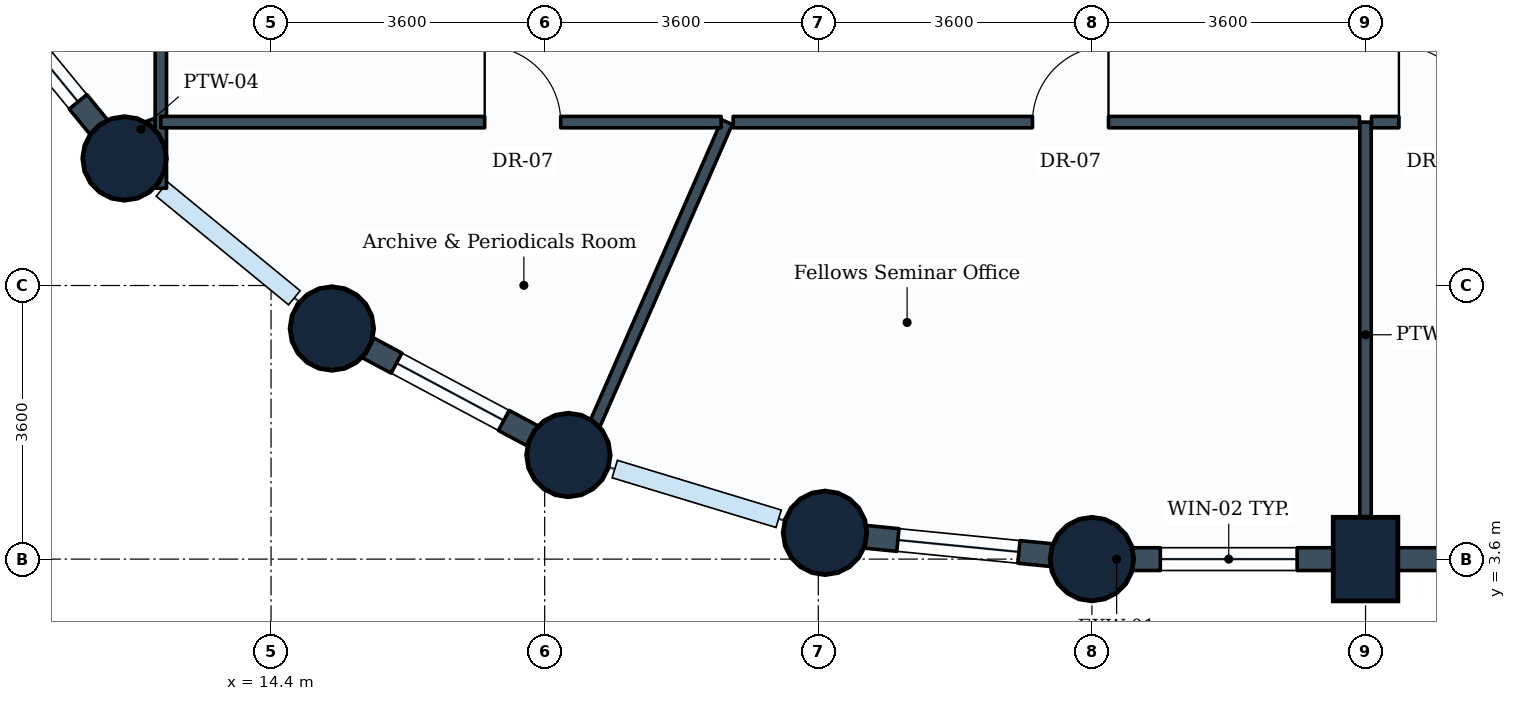
"""IFC4 building model, lengths in metres.
Left out: names, types, materials, properties, quantities, classifications, styles, units other than length and angle.
Written with IfcOpenShell. Run it as: python <this file> out.ifc"""

import sys

from ifc_helpers import new_model, si_unit, direction, frame, frame_2d, origin, origin_2d, place, context, subcontext, project, spatial, rectangle, circle, extrude, element, fill, save


model = new_model("IFC4")
c1 = context("Model", 3, precision=1e-05, world=origin(), true_north=direction((0.0, 1.0)))
c2 = subcontext(c1, "Body", "Model", "MODEL_VIEW")
j1 = project(units=[si_unit("LENGTHUNIT", "METRE"), si_unit("PLANEANGLEUNIT", "RADIAN")], contexts=[c1])
p1 = place(None, origin())
s1 = spatial("IfcSite", under=j1, at=p1, CompositionType="ELEMENT")
p2 = place(p1, origin())
s2 = spatial("IfcBuilding", under=s1, at=p2, CompositionType="ELEMENT")
p3 = place(p2, frame((0.0, 0.0, 87.9)))
s3 = spatial("IfcBuildingStorey", under=s2, at=p3, CompositionType="ELEMENT", Elevation=87.9)
for number, where, z_axis, x_axis in (
    (1, (12.472, 8.872, 0.0), (0.0, 0.0, 1.0), (1.0, 0.0, 0.0)),
    (2, (15.2, 6.634, 0.0), (0.0, 0.0, 1.0), (1.0, 0.0, 0.0)),
    (3, (18.312, 4.97, 0.0), (0.0, 0.0, 1.0), (1.0, 0.0, 0.0)),
    (4, (21.688, 3.946, 0.0), (0.0, 0.0, 1.0), (1.0, 0.0, 0.0)),
    (5, (25.2, 3.6, 0.0), (0.0, 0.0, 1.0), (1.0, 0.0, 0.0)),
):
    element("IfcColumn", number, at=place(p3, frame(where, z_axis=z_axis, x_axis=x_axis)), inside=s3, PredefinedType="COLUMN", context=c2, shape_type="SweptSolid", body=[
        extrude(circle(Radius=0.55, at=origin_2d()), origin(), (0.0, 0.0, 1.0), 3.9),
    ])
p4 = place(p3, frame((28.8, 3.6, 0.0), z_axis=(0.0, 0.0, 1.0), x_axis=(1.0, 0.0, 0.0)))
e6 = element("IfcColumn", 6, at=p4, inside=s3, PredefinedType="COLUMN", context=c2, shape_type="SweptSolid", body=[
    extrude(rectangle(XDim=0.85, YDim=1.1, at=origin_2d()), origin(), (0.0, 0.0, 1.0), 3.9),
])
p5 = place(p3, frame((28.8, 3.6, 0.0), z_axis=(0.0, 0.0, 1.0), x_axis=(-1.0, 0.0, 0.0)))
e7 = element("IfcWall", 7, at=p5, inside=s3, PredefinedType="STANDARD", context=c2, shape_type="SweptSolid", body=[
    extrude(rectangle(XDim=3.6, YDim=0.3, at=frame_2d((1.8, 0.0))), origin(), (0.0, 0.0, 1.0), 2.93),
])
p6 = place(p5, frame((0.9, 0.0, 0.85)))
e8 = element("IfcOpeningElement", 8, at=p6, cuts=e7, PredefinedType="OPENING", context=c2, shape_type="SweptSolid", body=[
    extrude(rectangle(XDim=1.8, YDim=1.35, at=frame_2d((0.9, 0.675))), frame((0.0, 0.16, 0.0), z_axis=(0.0, -1.0, 0.0), x_axis=(1.0, 0.0, 0.0)), (0.0, 0.0, 1.0), 0.32),
])
p7 = place(p3, frame((32.4, 3.6, 0.0), z_axis=(0.0, 0.0, 1.0), x_axis=(-1.0, 0.0, 0.0)))
e9 = element("IfcWall", 9, at=p7, inside=s3, PredefinedType="STANDARD", context=c2, shape_type="SweptSolid", body=[
    extrude(rectangle(XDim=3.6, YDim=0.3, at=frame_2d((1.8, 0.0))), origin(), (0.0, 0.0, 1.0), 2.93),
])
p8 = place(p3, frame((12.472, 8.872, 0.0), z_axis=(0.0, 0.0, 1.0), x_axis=(-0.634258295121, 0.773121216285, 0.0)))
e10 = element("IfcWall", 10, at=p8, inside=s3, PredefinedType="STANDARD", context=c2, shape_type="SweptSolid", body=[
    extrude(rectangle(XDim=3.529, YDim=0.3, at=frame_2d((1.764, 0.0))), origin(), (0.0, 0.0, 1.0), 2.93),
])
p9 = place(p8, frame((0.964, 0.0, 0.85)))
e11 = element("IfcOpeningElement", 11, at=p9, cuts=e10, PredefinedType="OPENING", context=c2, shape_type="SweptSolid", body=[
    extrude(rectangle(XDim=1.6, YDim=1.35, at=frame_2d((0.8, 0.675))), frame((0.0, 0.16, 0.0), z_axis=(0.0, -1.0, 0.0), x_axis=(1.0, 0.0, 0.0)), (0.0, 0.0, 1.0), 0.32),
])
p10 = place(p3, frame((18.312, 4.97, 0.0), z_axis=(0.0, 0.0, 1.0), x_axis=(-0.881846862014, 0.471535907389, 0.0)))
e12 = element("IfcWall", 12, at=p10, inside=s3, PredefinedType="STANDARD", context=c2, shape_type="SweptSolid", body=[
    extrude(rectangle(XDim=3.529, YDim=0.3, at=frame_2d((1.765, 0.0))), origin(), (0.0, 0.0, 1.0), 2.93),
])
p11 = place(p10, frame((0.964, 0.0, 0.85)))
e13 = element("IfcOpeningElement", 13, at=p11, cuts=e12, PredefinedType="OPENING", context=c2, shape_type="SweptSolid", body=[
    extrude(rectangle(XDim=1.6, YDim=1.35, at=frame_2d((0.8, 0.675))), frame((0.0, 0.16, 0.0), z_axis=(0.0, -1.0, 0.0), x_axis=(1.0, 0.0, 0.0)), (0.0, 0.0, 1.0), 0.32),
])
p12 = place(p3, frame((25.2, 3.6, 0.0), z_axis=(0.0, 0.0, 1.0), x_axis=(-0.995183369056, 0.098030923459, 0.0)))
e14 = element("IfcWall", 14, at=p12, inside=s3, PredefinedType="STANDARD", context=c2, shape_type="SweptSolid", body=[
    extrude(rectangle(XDim=3.529, YDim=0.3, at=frame_2d((1.765, 0.0))), origin(), (0.0, 0.0, 1.0), 2.93),
])
p13 = place(p12, frame((0.965, 0.0, 0.85)))
e15 = element("IfcOpeningElement", 15, at=p13, cuts=e14, PredefinedType="OPENING", context=c2, shape_type="SweptSolid", body=[
    extrude(rectangle(XDim=1.6, YDim=1.35, at=frame_2d((0.8, 0.675))), frame((0.0, 0.16, 0.0), z_axis=(0.0, -1.0, 0.0), x_axis=(1.0, 0.0, 0.0)), (0.0, 0.0, 1.0), 0.32),
])
p14 = place(p3, frame((28.8, 9.35, 0.0), z_axis=(0.0, 0.0, 1.0), x_axis=(0.0, -1.0, 0.0)))
e16 = element("IfcWall", 16, at=p14, inside=s3, PredefinedType="PARTITIONING", context=c2, shape_type="SweptSolid", body=[
    extrude(rectangle(XDim=5.596, YDim=0.15, at=frame_2d((2.798, 0.0))), origin(), (0.0, 0.0, 1.0), 3.635),
])
p15 = place(p3, frame((12.95, 9.35, 0.0), z_axis=(0.0, 0.0, 1.0), x_axis=(-0.939538101119, -0.342444384601, 0.0)))
e17 = element("IfcWall", 17, at=p15, inside=s3, PredefinedType="PARTITIONING", context=c2, shape_type="SweptSolid", body=[
    extrude(rectangle(XDim=0.559, YDim=0.15, at=frame_2d((0.279, 0.0))), origin(), (0.0, 0.0, 1.0), 2.93),
])
p16 = place(p3, frame((20.4, 9.35, 0.0), z_axis=(0.0, 0.0, 1.0), x_axis=(-0.400943051832, -0.916102979576, 0.0)))
e18 = element("IfcWall", 18, at=p16, inside=s3, PredefinedType="PARTITIONING", context=c2, shape_type="SweptSolid", body=[
    extrude(rectangle(XDim=4.846, YDim=0.15, at=frame_2d((2.423, 0.0))), origin(), (0.0, 0.0, 1.0), 2.93),
])
p17 = place(p3, frame((12.95, 8.48, 0.0), z_axis=(0.0, 0.0, 1.0), x_axis=(0.0, 1.0, 0.0)))
e19 = element("IfcWall", 19, at=p17, inside=s3, PredefinedType="PARTITIONING", context=c2, shape_type="SweptSolid", body=[
    extrude(rectangle(XDim=8.241, YDim=0.15, at=frame_2d((4.121, 0.0))), origin(), (0.0, 0.0, 1.0), 2.93),
])
p18 = place(p17, frame((5.131, 0.0, 0.0)))
e20 = element("IfcOpeningElement", 20, at=p18, cuts=e19, PredefinedType="OPENING", context=c2, shape_type="SweptSolid", body=[
    extrude(rectangle(XDim=1.0, YDim=2.1, at=frame_2d((0.5, 1.05))), frame((0.0, 0.085, 0.0), z_axis=(0.0, -1.0, 0.0), x_axis=(1.0, 0.0, 0.0)), (0.0, 0.0, 1.0), 0.17),
])
p19 = place(p3, frame((12.95, 9.35, 0.0), z_axis=(0.0, 0.0, 1.0), x_axis=(1.0, 0.0, 0.0)))
e21 = element("IfcWall", 21, at=p19, inside=s3, PredefinedType="PARTITIONING", context=c2, shape_type="SweptSolid", body=[
    extrude(rectangle(XDim=7.371, YDim=0.15, at=frame_2d((3.686, 0.0))), origin(), (0.0, 0.0, 1.0), 3.19),
])
p20 = place(p19, frame((4.261, 0.0, 0.0)))
e22 = element("IfcOpeningElement", 22, at=p20, cuts=e21, PredefinedType="OPENING", context=c2, shape_type="SweptSolid", body=[
    extrude(rectangle(XDim=1.0, YDim=2.1, at=frame_2d((0.5, 1.05))), frame((0.0, 0.085, 0.0), z_axis=(0.0, -1.0, 0.0), x_axis=(1.0, 0.0, 0.0)), (0.0, 0.0, 1.0), 0.17),
])
p21 = place(p3, frame((20.479, 9.35, 0.0), z_axis=(0.0, 0.0, 1.0), x_axis=(1.0, 0.0, 0.0)))
e23 = element("IfcWall", 23, at=p21, inside=s3, PredefinedType="PARTITIONING", context=c2, shape_type="SweptSolid", body=[
    extrude(rectangle(XDim=8.242, YDim=0.15, at=frame_2d((4.121, 0.0))), origin(), (0.0, 0.0, 1.0), 3.18),
])
p22 = place(p21, frame((3.939, 0.0, 0.0)))
e24 = element("IfcOpeningElement", 24, at=p22, cuts=e23, PredefinedType="OPENING", context=c2, shape_type="SweptSolid", body=[
    extrude(rectangle(XDim=1.0, YDim=2.1, at=frame_2d((0.5, 1.05))), frame((0.0, 0.085, 0.0), z_axis=(0.0, -1.0, 0.0), x_axis=(1.0, 0.0, 0.0)), (0.0, 0.0, 1.0), 0.17),
])
p23 = place(p3, frame((28.879, 9.35, 0.0), z_axis=(0.0, 0.0, 1.0), x_axis=(1.0, 0.0, 0.0)))
e25 = element("IfcWall", 25, at=p23, inside=s3, PredefinedType="PARTITIONING", context=c2, shape_type="SweptSolid", body=[
    extrude(rectangle(XDim=5.521, YDim=0.15, at=frame_2d((2.76, 0.0))), origin(), (0.0, 0.0, 1.0), 3.635),
])
p24 = place(p23, frame((0.36, 0.0, 0.0)))
e26 = element("IfcOpeningElement", 26, at=p24, cuts=e25, PredefinedType="OPENING", context=c2, shape_type="SweptSolid", body=[
    extrude(rectangle(XDim=1.0, YDim=2.1, at=frame_2d((0.5, 1.05))), frame((0.0, 0.085, 0.0), z_axis=(0.0, -1.0, 0.0), x_axis=(1.0, 0.0, 0.0)), (0.0, 0.0, 1.0), 0.17),
])
p25 = place(p6, origin())
e27 = element("IfcWindow", 27, at=p25, inside=s3, PartitioningType="SINGLE_PANEL", PredefinedType="WINDOW", context=c2, shape_type="SweptSolid", body=[
    extrude(rectangle(XDim=1.8, YDim=1.35, at=frame_2d((0.9, 0.675))), frame((0.0, 0.03, 0.0), z_axis=(0.0, -1.0, 0.0), x_axis=(1.0, 0.0, 0.0)), (0.0, 0.0, 1.0), 0.06),
])
fill(e8, e27)
p26 = place(p9, origin())
e28 = element("IfcWindow", 28, at=p26, inside=s3, PartitioningType="SINGLE_PANEL", PredefinedType="WINDOW", context=c2, shape_type="SweptSolid", body=[
    extrude(rectangle(XDim=1.6, YDim=1.35, at=frame_2d((0.8, 0.675))), frame((0.0, 0.03, 0.0), z_axis=(0.0, -1.0, 0.0), x_axis=(1.0, 0.0, 0.0)), (0.0, 0.0, 1.0), 0.06),
])
fill(e11, e28)
p27 = place(p11, origin())
e29 = element("IfcWindow", 29, at=p27, inside=s3, PartitioningType="SINGLE_PANEL", PredefinedType="WINDOW", context=c2, shape_type="SweptSolid", body=[
    extrude(rectangle(XDim=1.6, YDim=1.35, at=frame_2d((0.8, 0.675))), frame((0.0, 0.03, 0.0), z_axis=(0.0, -1.0, 0.0), x_axis=(1.0, 0.0, 0.0)), (0.0, 0.0, 1.0), 0.06),
])
fill(e13, e29)
p28 = place(p13, origin())
e30 = element("IfcWindow", 30, at=p28, inside=s3, PartitioningType="SINGLE_PANEL", PredefinedType="WINDOW", context=c2, shape_type="SweptSolid", body=[
    extrude(rectangle(XDim=1.6, YDim=1.35, at=frame_2d((0.8, 0.675))), frame((0.0, 0.03, 0.0), z_axis=(0.0, -1.0, 0.0), x_axis=(1.0, 0.0, 0.0)), (0.0, 0.0, 1.0), 0.06),
])
fill(e15, e30)
p29 = place(p20, origin())
e31 = element("IfcDoor", 31, at=p29, inside=s3, OperationType="SINGLE_SWING_LEFT", PredefinedType="DOOR", context=c2, shape_type="SweptSolid", body=[
    extrude(rectangle(XDim=1.0, YDim=2.1, at=frame_2d((0.5, 1.05))), frame((0.0, 0.025, 0.0), z_axis=(0.0, -1.0, 0.0), x_axis=(1.0, 0.0, 0.0)), (0.0, 0.0, 1.0), 0.05),
])
fill(e22, e31)
p30 = place(p22, origin())
e32 = element("IfcDoor", 32, at=p30, inside=s3, OperationType="SINGLE_SWING_RIGHT", PredefinedType="DOOR", context=c2, shape_type="SweptSolid", body=[
    extrude(rectangle(XDim=1.0, YDim=2.1, at=frame_2d((0.5, 1.05))), frame((0.0, 0.025, 0.0), z_axis=(0.0, -1.0, 0.0), x_axis=(1.0, 0.0, 0.0)), (0.0, 0.0, 1.0), 0.05),
])
fill(e24, e32)
p31 = place(p24, origin())
e33 = element("IfcDoor", 33, at=p31, inside=s3, OperationType="SINGLE_SWING_LEFT", PredefinedType="DOOR", context=c2, shape_type="SweptSolid", body=[
    extrude(rectangle(XDim=1.0, YDim=2.1, at=frame_2d((0.5, 1.05))), frame((0.0, 0.025, 0.0), z_axis=(0.0, -1.0, 0.0), x_axis=(1.0, 0.0, 0.0)), (0.0, 0.0, 1.0), 0.05),
])
fill(e26, e33)
save(model, sys.argv[1])
